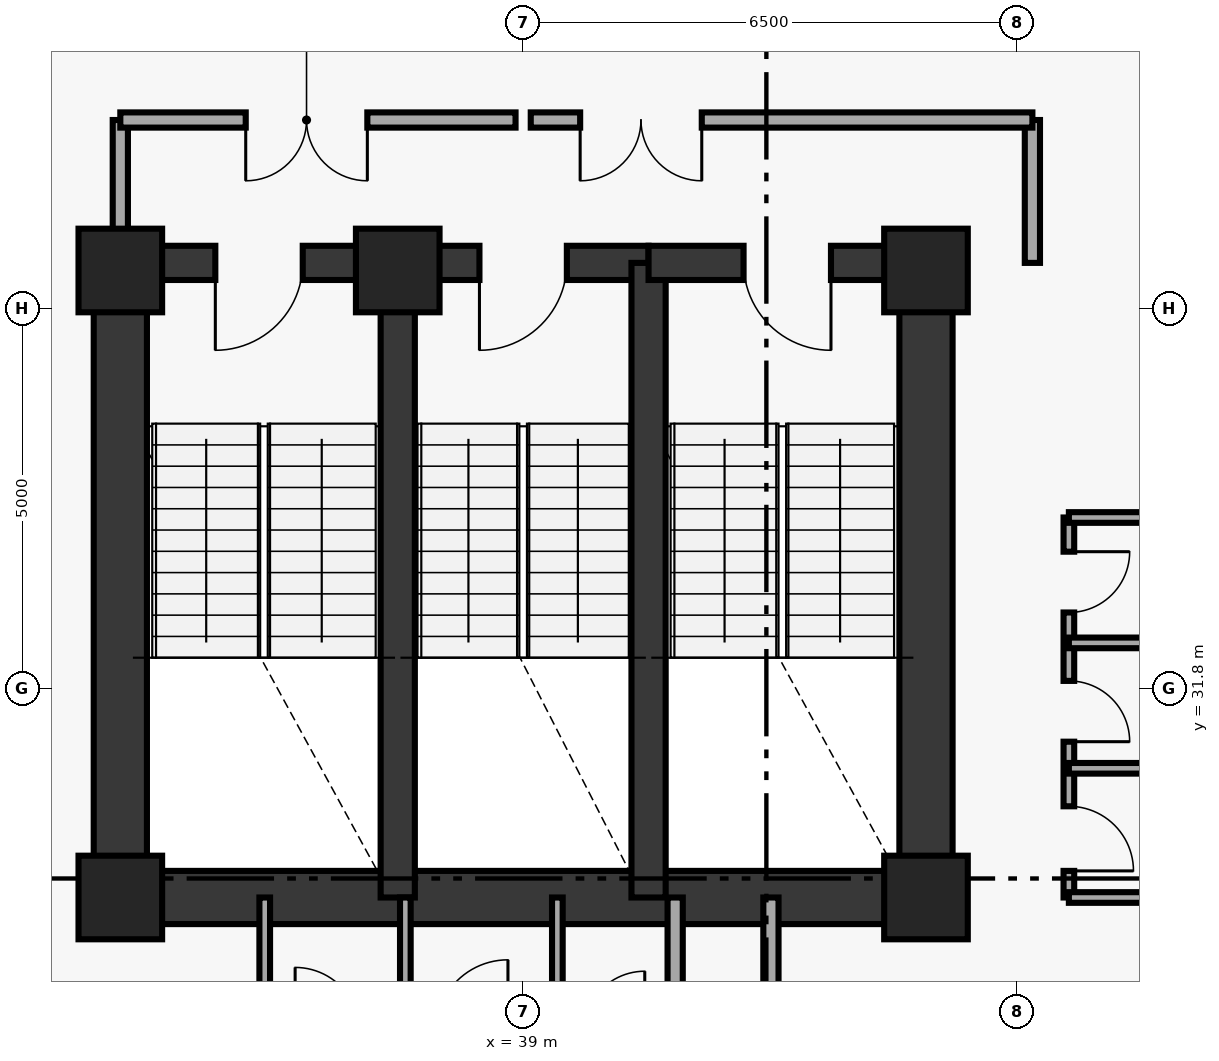
"""IFC4 building model, lengths in metres.
Left out: names, types, materials, properties, quantities, classifications, styles, units other than length and angle.
Written with IfcOpenShell. Run it as: python <this file> out.ifc"""

import sys

from ifc_helpers import new_model, si_unit, direction, frame, frame_2d, origin, origin_2d, place, context, subcontext, project, spatial, rectangle, extrude, element, fill, save


model = new_model("IFC4")
c1 = context("Model", 3, precision=1e-05, world=origin(), true_north=direction((0.0, 1.0)))
c2 = subcontext(c1, "Body", "Model", "MODEL_VIEW")
j1 = project(units=[si_unit("LENGTHUNIT", "METRE"), si_unit("PLANEANGLEUNIT", "RADIAN")], contexts=[c1])
p1 = place(None, origin())
s1 = spatial("IfcSite", under=j1, at=p1, CompositionType="ELEMENT")
p2 = place(p1, origin())
s2 = spatial("IfcBuilding", under=s1, at=p2, CompositionType="ELEMENT")
p3 = place(p2, frame((0.0, 0.0, 65.55)))
s3 = spatial("IfcBuildingStorey", under=s2, at=p3, CompositionType="ELEMENT", Elevation=65.55)
for number, where, z_axis, x_axis in (
    (1, (44.3, 29.05, 0.0), (0.0, 0.0, 1.0), (1.0, 0.0, 0.0)),
    (2, (44.3, 37.3, 0.0), (0.0, 0.0, 1.0), (1.0, 0.0, 0.0)),
    (3, (37.35, 37.3, 0.0), (0.0, 0.0, 1.0), (1.0, 0.0, 0.0)),
    (4, (33.7, 37.3, 0.0), (0.0, 0.0, 1.0), (1.0, 0.0, 0.0)),
    (5, (33.7, 29.05, 0.0), (0.0, 0.0, 1.0), (1.0, 0.0, 0.0)),
):
    element("IfcColumn", number, at=place(p3, frame(where, z_axis=z_axis, x_axis=x_axis)), inside=s3, PredefinedType="PILASTER", context=c2, shape_type="SweptSolid", body=[
        extrude(rectangle(XDim=1.1, YDim=1.1, at=origin_2d()), origin(), (0.0, 0.0, 1.0), 3.8),
    ])
for number, where, z_axis, x_axis in (
    (6, (33.7, 29.05, 0.0), (0.0, 0.0, 1.0), (0.0, 1.0, 0.0)),
    (7, (44.3, 29.05, 0.0), (0.0, 0.0, 1.0), (0.0, 1.0, 0.0)),
):
    element("IfcWall", number, at=place(p3, frame(where, z_axis=z_axis, x_axis=x_axis)), inside=s3, PredefinedType="SHEAR", context=c2, shape_type="SweptSolid", body=[
        extrude(rectangle(XDim=8.35, YDim=0.7, at=frame_2d((4.175, 0.0))), origin(), (0.0, 0.0, 1.0), 3.8),
    ])
p4 = place(p3, frame((33.7, 29.05, 0.0), z_axis=(0.0, 0.0, 1.0), x_axis=(1.0, 0.0, 0.0)))
e8 = element("IfcWall", 8, at=p4, inside=s3, PredefinedType="SHEAR", context=c2, shape_type="SweptSolid", body=[
    extrude(rectangle(XDim=10.6, YDim=0.7, at=frame_2d((5.3, 0.0))), origin(), (0.0, 0.0, 1.0), 3.8),
])
p5 = place(p3, frame((37.35, 37.4, 0.0), z_axis=(0.0, 0.0, 1.0), x_axis=(-1.0, 0.0, 0.0)))
e9 = element("IfcWall", 9, at=p5, inside=s3, PredefinedType="SHEAR", context=c2, shape_type="SweptSolid", body=[
    extrude(rectangle(XDim=3.65, YDim=0.45, at=frame_2d((1.825, 0.0))), origin(), (0.0, 0.0, 1.0), 3.8),
])
p6 = place(p5, frame((1.25, 0.0, 0.0)))
e10 = element("IfcOpeningElement", 10, at=p6, cuts=e9, PredefinedType="OPENING", context=c2, shape_type="SweptSolid", body=[
    extrude(rectangle(XDim=1.15, YDim=2.15, at=frame_2d((0.575, 1.075))), frame((0.0, 0.235, 0.0), z_axis=(0.0, -1.0, 0.0), x_axis=(1.0, 0.0, 0.0)), (0.0, 0.0, 1.0), 0.47),
])
p7 = place(p3, frame((37.35, 29.05, 0.0), z_axis=(0.0, 0.0, 1.0), x_axis=(0.0, 1.0, 0.0)))
e11 = element("IfcWall", 11, at=p7, inside=s3, PredefinedType="SHEAR", context=c2, shape_type="SweptSolid", body=[
    extrude(rectangle(XDim=8.35, YDim=0.45, at=frame_2d((4.175, 0.0))), origin(), (0.0, 0.0, 1.0), 3.8),
])
p8 = place(p3, frame((40.65, 37.4, 0.0), z_axis=(0.0, 0.0, 1.0), x_axis=(-1.0, 0.0, 0.0)))
e12 = element("IfcWall", 12, at=p8, inside=s3, PredefinedType="SHEAR", context=c2, shape_type="SweptSolid", body=[
    extrude(rectangle(XDim=3.3, YDim=0.45, at=frame_2d((1.65, 0.0))), origin(), (0.0, 0.0, 1.0), 3.8),
])
p9 = place(p8, frame((1.075, 0.0, 0.0)))
e13 = element("IfcOpeningElement", 13, at=p9, cuts=e12, PredefinedType="OPENING", context=c2, shape_type="SweptSolid", body=[
    extrude(rectangle(XDim=1.15, YDim=2.15, at=frame_2d((0.575, 1.075))), frame((0.0, 0.235, 0.0), z_axis=(0.0, -1.0, 0.0), x_axis=(1.0, 0.0, 0.0)), (0.0, 0.0, 1.0), 0.47),
])
p10 = place(p3, frame((40.65, 29.05, 0.0), z_axis=(0.0, 0.0, 1.0), x_axis=(0.0, 1.0, 0.0)))
e14 = element("IfcWall", 14, at=p10, inside=s3, PredefinedType="SHEAR", context=c2, shape_type="SweptSolid", body=[
    extrude(rectangle(XDim=8.35, YDim=0.45, at=frame_2d((4.175, 0.0))), origin(), (0.0, 0.0, 1.0), 3.8),
])
p11 = place(p3, frame((44.3, 37.4, 0.0), z_axis=(0.0, 0.0, 1.0), x_axis=(-1.0, 0.0, 0.0)))
e15 = element("IfcWall", 15, at=p11, inside=s3, PredefinedType="SHEAR", context=c2, shape_type="SweptSolid", body=[
    extrude(rectangle(XDim=3.65, YDim=0.45, at=frame_2d((1.825, 0.0))), origin(), (0.0, 0.0, 1.0), 3.8),
])
p12 = place(p11, frame((1.25, 0.0, 0.0)))
e16 = element("IfcOpeningElement", 16, at=p12, cuts=e15, PredefinedType="OPENING", context=c2, shape_type="SweptSolid", body=[
    extrude(rectangle(XDim=1.15, YDim=2.15, at=frame_2d((0.575, 1.075))), frame((0.0, 0.235, 0.0), z_axis=(0.0, -1.0, 0.0), x_axis=(1.0, 0.0, 0.0)), (0.0, 0.0, 1.0), 0.47),
])
for number, where, z_axis, x_axis in (
    (17, (33.7, 37.4, 0.0), (0.0, 0.0, 1.0), (0.0, 1.0, 0.0)),
    (18, (45.7, 37.4, 0.0), (0.0, 0.0, 1.0), (0.0, 1.0, 0.0)),
):
    element("IfcWall", number, at=place(p3, frame(where, z_axis=z_axis, x_axis=x_axis)), inside=s3, PredefinedType="SOLIDWALL", context=c2, shape_type="SweptSolid", body=[
        extrude(rectangle(XDim=1.88, YDim=0.2, at=frame_2d((0.94, 0.0))), origin(), (0.0, 0.0, 1.0), 3.8),
    ])
p13 = place(p3, frame((38.9, 39.28, 0.0), z_axis=(0.0, 0.0, 1.0), x_axis=(-1.0, 0.0, 0.0)))
e19 = element("IfcWall", 19, at=p13, inside=s3, PredefinedType="SOLIDWALL", context=c2, shape_type="SweptSolid", body=[
    extrude(rectangle(XDim=5.2, YDim=0.2, at=frame_2d((2.6, 0.0))), origin(), (0.0, 0.0, 1.0), 3.8),
])
p14 = place(p13, frame((1.95, 0.0, 0.0)))
e20 = element("IfcOpeningElement", 20, at=p14, cuts=e19, PredefinedType="OPENING", context=c2, shape_type="SweptSolid", body=[
    extrude(rectangle(XDim=1.6, YDim=2.2, at=frame_2d((0.8, 1.1))), frame((0.0, 0.11, 0.0), z_axis=(0.0, -1.0, 0.0), x_axis=(1.0, 0.0, 0.0)), (0.0, 0.0, 1.0), 0.22),
])
p15 = place(p3, frame((45.7, 39.28, 0.0), z_axis=(0.0, 0.0, 1.0), x_axis=(-1.0, 0.0, 0.0)))
e21 = element("IfcWall", 21, at=p15, inside=s3, PredefinedType="SOLIDWALL", context=c2, shape_type="SweptSolid", body=[
    extrude(rectangle(XDim=6.6, YDim=0.2, at=frame_2d((3.3, 0.0))), origin(), (0.0, 0.0, 1.0), 3.8),
])
p16 = place(p15, frame((4.35, 0.0, 0.0)))
e22 = element("IfcOpeningElement", 22, at=p16, cuts=e21, PredefinedType="OPENING", context=c2, shape_type="SweptSolid", body=[
    extrude(rectangle(XDim=1.6, YDim=2.2, at=frame_2d((0.8, 1.1))), frame((0.0, 0.11, 0.0), z_axis=(0.0, -1.0, 0.0), x_axis=(1.0, 0.0, 0.0)), (0.0, 0.0, 1.0), 0.22),
])
p17 = place(p3, frame((35.6, 27.28, 0.0), z_axis=(0.0, 0.0, 1.0), x_axis=(0.0, 1.0, 0.0)))
e23 = element("IfcWall", 23, at=p17, inside=s3, PredefinedType="PARTITIONING", context=c2, shape_type="SweptSolid", body=[
    extrude(rectangle(XDim=1.77, YDim=0.14, at=frame_2d((0.885, 0.0))), origin(), (0.0, 0.0, 1.0), 3.8),
])
for number, where, z_axis, x_axis in (
    (24, (41.0, 27.28, 0.0), (0.0, 0.0, 1.0), (0.0, 1.0, 0.0)),
    (25, (42.26, 27.28, 0.0), (0.0, 0.0, 1.0), (0.0, 1.0, 0.0)),
):
    element("IfcWall", number, at=place(p3, frame(where, z_axis=z_axis, x_axis=x_axis)), inside=s3, PredefinedType="SOLIDWALL", context=c2, shape_type="SweptSolid", body=[
        extrude(rectangle(XDim=1.77, YDim=0.2, at=frame_2d((0.885, 0.0))), origin(), (0.0, 0.0, 1.0), 3.8),
    ])
for number, where, z_axis, x_axis in (
    (26, (37.45, 27.28, 0.0), (0.0, 0.0, 1.0), (0.0, 1.0, 0.0)),
    (27, (39.45, 27.28, 0.0), (0.0, 0.0, 1.0), (0.0, 1.0, 0.0)),
):
    element("IfcWall", number, at=place(p3, frame(where, z_axis=z_axis, x_axis=x_axis)), inside=s3, PredefinedType="PARTITIONING", context=c2, shape_type="SweptSolid", body=[
        extrude(rectangle(XDim=1.77, YDim=0.14, at=frame_2d((0.885, 0.0))), origin(), (0.0, 0.0, 1.0), 3.8),
    ])
p18 = place(p3, frame((46.18, 34.05, 0.0), z_axis=(0.0, 0.0, 1.0), x_axis=(0.0, -1.0, 0.0)))
e28 = element("IfcWall", 28, at=p18, inside=s3, PredefinedType="PARTITIONING", context=c2, shape_type="SweptSolid", body=[
    extrude(rectangle(XDim=5.0, YDim=0.14, at=frame_2d((2.5, 0.0))), origin(), (0.0, 0.0, 1.0), 3.8),
])
p19 = place(p18, frame((3.8, 0.0, 0.0)))
e29 = element("IfcOpeningElement", 29, at=p19, cuts=e28, PredefinedType="OPENING", context=c2, shape_type="SweptSolid", body=[
    extrude(rectangle(XDim=0.85, YDim=2.1, at=frame_2d((0.425, 1.05))), frame((0.0, 0.08, 0.0), z_axis=(0.0, -1.0, 0.0), x_axis=(1.0, 0.0, 0.0)), (0.0, 0.0, 1.0), 0.16),
])
p20 = place(p18, frame((2.15, 0.0, 0.0)))
e30 = element("IfcOpeningElement", 30, at=p20, cuts=e28, PredefinedType="OPENING", context=c2, shape_type="SweptSolid", body=[
    extrude(rectangle(XDim=0.8, YDim=2.05, at=frame_2d((0.4, 1.025))), frame((0.0, 0.08, 0.0), z_axis=(0.0, -1.0, 0.0), x_axis=(1.0, 0.0, 0.0)), (0.0, 0.0, 1.0), 0.16),
])
p21 = place(p18, frame((0.45, 0.0, 0.0)))
e31 = element("IfcOpeningElement", 31, at=p21, cuts=e28, PredefinedType="OPENING", context=c2, shape_type="SweptSolid", body=[
    extrude(rectangle(XDim=0.8, YDim=2.05, at=frame_2d((0.4, 1.025))), frame((0.0, 0.08, 0.0), z_axis=(0.0, -1.0, 0.0), x_axis=(1.0, 0.0, 0.0)), (0.0, 0.0, 1.0), 0.16),
])
for number, where, z_axis, x_axis in (
    (32, (46.18, 29.05, 0.0), (0.0, 0.0, 1.0), (1.0, 0.0, 0.0)),
    (33, (46.18, 30.75, 0.0), (0.0, 0.0, 1.0), (1.0, 0.0, 0.0)),
    (34, (46.18, 32.4, 0.0), (0.0, 0.0, 1.0), (1.0, 0.0, 0.0)),
    (35, (46.18, 34.05, 0.0), (0.0, 0.0, 1.0), (1.0, 0.0, 0.0)),
):
    element("IfcWall", number, at=place(p3, frame(where, z_axis=z_axis, x_axis=x_axis)), inside=s3, PredefinedType="PARTITIONING", context=c2, shape_type="SweptSolid", body=[
        extrude(rectangle(XDim=1.64, YDim=0.14, at=frame_2d((0.82, 0.0))), origin(), (0.0, 0.0, 1.0), 3.8),
    ])
p22 = place(p3, frame((46.703, 42.204, 0.0), z_axis=(0.0, 0.0, 1.0), x_axis=(0.757713718274, -0.652587098508, 0.0)))
e36 = element("IfcWall", 36, at=p22, inside=s3, PredefinedType="PARTITIONING", context=c2, shape_type="SweptSolid", body=[
    extrude(rectangle(XDim=4.261, YDim=0.16, at=frame_2d((2.131, 0.0))), origin(), (0.0, 0.0, 1.0), 3.8),
])
p23 = place(p22, frame((3.112, 0.0, 0.0)))
e37 = element("IfcOpeningElement", 37, at=p23, cuts=e36, PredefinedType="OPENING", context=c2, shape_type="SweptSolid", body=[
    extrude(rectangle(XDim=0.95, YDim=2.15, at=frame_2d((0.475, 1.075))), frame((0.0, 0.09, 0.0), z_axis=(0.0, -1.0, 0.0), x_axis=(1.0, 0.0, 0.0)), (0.0, 0.0, 1.0), 0.18),
])
p24 = place(p3, frame((44.06, 44.668, 0.0), z_axis=(0.0, 0.0, 1.0), x_axis=(0.877568372218, -0.479451511712, 0.0)))
e38 = element("IfcWall", 38, at=p24, inside=s3, PredefinedType="MOVABLE", context=c2, shape_type="SweptSolid", body=[
    extrude(rectangle(XDim=9.987, YDim=0.1, at=frame_2d((4.993, 0.0))), origin(), (0.0, 0.0, 1.0), 3.8),
])
p25 = place(p24, frame((7.33, 0.0, 0.0)))
e39 = element("IfcOpeningElement", 39, at=p25, cuts=e38, PredefinedType="OPENING", context=c2, shape_type="SweptSolid", body=[
    extrude(rectangle(XDim=0.9, YDim=2.1, at=frame_2d((0.45, 1.05))), frame((0.0, 0.06, 0.0), z_axis=(0.0, -1.0, 0.0), x_axis=(1.0, 0.0, 0.0)), (0.0, 0.0, 1.0), 0.12),
])
p26 = place(p3, frame((25.176, 39.88, 0.0), z_axis=(0.0, 0.0, 1.0), x_axis=(0.877568372218, 0.479451511712, 0.0)))
e40 = element("IfcWall", 40, at=p26, inside=s3, PredefinedType="MOVABLE", context=c2, shape_type="SweptSolid", body=[
    extrude(rectangle(XDim=9.987, YDim=0.1, at=frame_2d((4.993, 0.0))), origin(), (0.0, 0.0, 1.0), 3.8),
])
p27 = place(p26, frame((4.543, 0.0, 0.0)))
e41 = element("IfcOpeningElement", 41, at=p27, cuts=e40, PredefinedType="OPENING", context=c2, shape_type="SweptSolid", body=[
    extrude(rectangle(XDim=0.9, YDim=2.1, at=frame_2d((0.45, 1.05))), frame((0.0, 0.06, 0.0), z_axis=(0.0, -1.0, 0.0), x_axis=(1.0, 0.0, 0.0)), (0.0, 0.0, 1.0), 0.12),
])
p28 = place(p6, origin())
e42 = element("IfcDoor", 42, at=p28, inside=s3, OperationType="SINGLE_SWING_RIGHT", PredefinedType="DOOR", context=c2, shape_type="SweptSolid", body=[
    extrude(rectangle(XDim=1.15, YDim=2.15, at=frame_2d((0.575, 1.075))), frame((0.0, 0.025, 0.0), z_axis=(0.0, -1.0, 0.0), x_axis=(1.0, 0.0, 0.0)), (0.0, 0.0, 1.0), 0.05),
])
fill(e10, e42)
p29 = place(p9, origin())
e43 = element("IfcDoor", 43, at=p29, inside=s3, OperationType="SINGLE_SWING_RIGHT", PredefinedType="DOOR", context=c2, shape_type="SweptSolid", body=[
    extrude(rectangle(XDim=1.15, YDim=2.15, at=frame_2d((0.575, 1.075))), frame((0.0, 0.025, 0.0), z_axis=(0.0, -1.0, 0.0), x_axis=(1.0, 0.0, 0.0)), (0.0, 0.0, 1.0), 0.05),
])
fill(e13, e43)
p30 = place(p12, origin())
e44 = element("IfcDoor", 44, at=p30, inside=s3, OperationType="SINGLE_SWING_LEFT", PredefinedType="DOOR", context=c2, shape_type="SweptSolid", body=[
    extrude(rectangle(XDim=1.15, YDim=2.15, at=frame_2d((0.575, 1.075))), frame((0.0, 0.025, 0.0), z_axis=(0.0, -1.0, 0.0), x_axis=(1.0, 0.0, 0.0)), (0.0, 0.0, 1.0), 0.05),
])
fill(e16, e44)
p31 = place(p14, origin())
e45 = element("IfcDoor", 45, at=p31, inside=s3, OperationType="DOUBLE_DOOR_SINGLE_SWING", PredefinedType="DOOR", context=c2, shape_type="SweptSolid", body=[
    extrude(rectangle(XDim=1.6, YDim=2.2, at=frame_2d((0.8, 1.1))), frame((0.0, 0.025, 0.0), z_axis=(0.0, -1.0, 0.0), x_axis=(1.0, 0.0, 0.0)), (0.0, 0.0, 1.0), 0.05),
])
fill(e20, e45)
p32 = place(p16, origin())
e46 = element("IfcDoor", 46, at=p32, inside=s3, OperationType="DOUBLE_DOOR_SINGLE_SWING", PredefinedType="DOOR", context=c2, shape_type="SweptSolid", body=[
    extrude(rectangle(XDim=1.6, YDim=2.2, at=frame_2d((0.8, 1.1))), frame((0.0, 0.025, 0.0), z_axis=(0.0, -1.0, 0.0), x_axis=(1.0, 0.0, 0.0)), (0.0, 0.0, 1.0), 0.05),
])
fill(e22, e46)
p33 = place(p19, origin())
e47 = element("IfcDoor", 47, at=p33, inside=s3, OperationType="SINGLE_SWING_RIGHT", PredefinedType="DOOR", context=c2, shape_type="SweptSolid", body=[
    extrude(rectangle(XDim=0.85, YDim=2.1, at=frame_2d((0.425, 1.05))), frame((0.0, 0.025, 0.0), z_axis=(0.0, -1.0, 0.0), x_axis=(1.0, 0.0, 0.0)), (0.0, 0.0, 1.0), 0.05),
])
fill(e29, e47)
p34 = place(p20, origin())
e48 = element("IfcDoor", 48, at=p34, inside=s3, OperationType="SINGLE_SWING_RIGHT", PredefinedType="DOOR", context=c2, shape_type="SweptSolid", body=[
    extrude(rectangle(XDim=0.8, YDim=2.05, at=frame_2d((0.4, 1.025))), frame((0.0, 0.025, 0.0), z_axis=(0.0, -1.0, 0.0), x_axis=(1.0, 0.0, 0.0)), (0.0, 0.0, 1.0), 0.05),
])
fill(e30, e48)
p35 = place(p21, origin())
e49 = element("IfcDoor", 49, at=p35, inside=s3, OperationType="SINGLE_SWING_LEFT", PredefinedType="DOOR", context=c2, shape_type="SweptSolid", body=[
    extrude(rectangle(XDim=0.8, YDim=2.05, at=frame_2d((0.4, 1.025))), frame((0.0, 0.025, 0.0), z_axis=(0.0, -1.0, 0.0), x_axis=(1.0, 0.0, 0.0)), (0.0, 0.0, 1.0), 0.05),
])
fill(e31, e49)
save(model, sys.argv[1])
